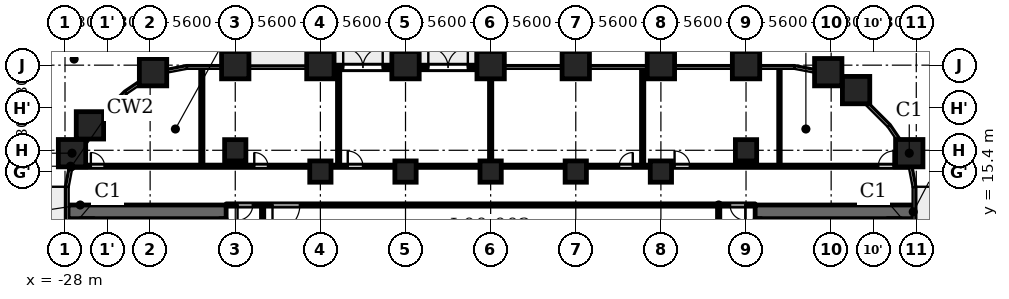
"""IFC4 building model, lengths in metres.
Left out: names, types, materials, properties, quantities, classifications, styles, units other than length and angle.
Written with IfcOpenShell. Run it as: python <this file> out.ifc"""

import sys

from ifc_helpers import new_model, si_unit, direction, frame, frame_2d, origin, origin_2d, place, context, subcontext, project, spatial, rectangle, extrude, element, fill, save


model = new_model("IFC4")
c1 = context("Model", 3, precision=1e-05, world=origin(), true_north=direction((0.0, 1.0)))
c2 = subcontext(c1, "Body", "Model", "MODEL_VIEW")
j1 = project(units=[si_unit("LENGTHUNIT", "METRE"), si_unit("PLANEANGLEUNIT", "RADIAN")], contexts=[c1])
p1 = place(None, origin())
s1 = spatial("IfcSite", under=j1, at=p1, CompositionType="ELEMENT")
p2 = place(p1, origin())
s2 = spatial("IfcBuilding", under=s1, at=p2, CompositionType="ELEMENT")
p3 = place(p2, origin())
s3 = spatial("IfcBuildingStorey", under=s2, at=p3, CompositionType="ELEMENT", Elevation=0.0)
for number, where, z_axis, x_axis in (
    (1, (27.538, 16.609, 0.0), (0.0, 0.0, 1.0), (1.0, 0.0, 0.0)),
    (2, (24.04, 20.76, 0.0), (0.0, 0.0, 1.0), (1.0, 0.0, 0.0)),
    (3, (22.209, 21.938, 0.0), (0.0, 0.0, 1.0), (1.0, 0.0, 0.0)),
    (4, (16.8, 22.4, 0.0), (0.0, 0.0, 1.0), (1.0, 0.0, 0.0)),
    (5, (11.2, 22.4, 0.0), (0.0, 0.0, 1.0), (1.0, 0.0, 0.0)),
    (6, (5.6, 22.4, 0.0), (0.0, 0.0, 1.0), (1.0, 0.0, 0.0)),
    (7, (0.0, 22.4, 0.0), (0.0, 0.0, 1.0), (1.0, 0.0, 0.0)),
    (8, (-5.6, 22.4, 0.0), (0.0, 0.0, 1.0), (1.0, 0.0, 0.0)),
    (9, (-11.2, 22.4, 0.0), (0.0, 0.0, 1.0), (1.0, 0.0, 0.0)),
    (10, (-16.8, 22.4, 0.0), (0.0, 0.0, 1.0), (1.0, 0.0, 0.0)),
    (11, (-22.209, 21.938, 0.0), (0.0, 0.0, 1.0), (1.0, 0.0, 0.0)),
    (12, (-26.36, 18.44, 0.0), (0.0, 0.0, 1.0), (1.0, 0.0, 0.0)),
    (13, (-27.538, 16.609, 0.0), (0.0, 0.0, 1.0), (1.0, 0.0, 0.0)),
):
    element("IfcColumn", number, at=place(p3, frame(where, z_axis=z_axis, x_axis=x_axis)), inside=s3, PredefinedType="COLUMN", context=c2, shape_type="SweptSolid", body=[
        extrude(rectangle(XDim=1.8, YDim=1.8, at=origin_2d()), origin(), (0.0, 0.0, 1.0), 6.5),
    ])
for number, where, z_axis, x_axis in (
    (14, (-16.8, 16.8, 0.0), (0.0, 0.0, 1.0), (1.0, 0.0, 0.0)),
    (15, (16.8, 16.8, 0.0), (0.0, 0.0, 1.0), (1.0, 0.0, 0.0)),
    (16, (-11.2, 15.4, 0.0), (0.0, 0.0, 1.0), (1.0, 0.0, 0.0)),
    (17, (-5.6, 15.4, 0.0), (0.0, 0.0, 1.0), (1.0, 0.0, 0.0)),
    (18, (0.0, 15.4, 0.0), (0.0, 0.0, 1.0), (1.0, 0.0, 0.0)),
    (19, (5.6, 15.4, 0.0), (0.0, 0.0, 1.0), (1.0, 0.0, 0.0)),
    (20, (11.2, 15.4, 0.0), (0.0, 0.0, 1.0), (1.0, 0.0, 0.0)),
):
    element("IfcColumn", number, at=place(p3, frame(where, z_axis=z_axis, x_axis=x_axis)), inside=s3, PredefinedType="COLUMN", context=c2, shape_type="SweptSolid", body=[
        extrude(rectangle(XDim=1.4, YDim=1.4, at=origin_2d()), origin(), (0.0, 0.0, 1.0), 6.5),
    ])
p4 = place(p3, frame((-4.7, 22.25, 0.0), z_axis=(0.0, 0.0, 1.0), x_axis=(1.0, 0.0, 0.0)))
e21 = element("IfcWall", 21, at=p4, inside=s3, PredefinedType="SOLIDWALL", context=c2, shape_type="SweptSolid", body=[
    extrude(rectangle(XDim=3.8, YDim=0.3, at=frame_2d((1.9, 0.0))), origin(), (0.0, 0.0, 1.0), 5.25),
])
p5 = place(p4, frame((0.6, 0.0, 0.0)))
e22 = element("IfcOpeningElement", 22, at=p5, cuts=e21, PredefinedType="OPENING", context=c2, shape_type="SweptSolid", body=[
    extrude(rectangle(XDim=2.6, YDim=2.4, at=frame_2d((1.3, 1.2))), frame((0.0, 0.16, 0.0), z_axis=(0.0, -1.0, 0.0), x_axis=(1.0, 0.0, 0.0)), (0.0, 0.0, 1.0), 0.32),
])
p6 = place(p3, frame((-10.3, 22.25, 0.0), z_axis=(0.0, 0.0, 1.0), x_axis=(1.0, 0.0, 0.0)))
e23 = element("IfcWall", 23, at=p6, inside=s3, PredefinedType="SOLIDWALL", context=c2, shape_type="SweptSolid", body=[
    extrude(rectangle(XDim=3.8, YDim=0.3, at=frame_2d((1.9, 0.0))), origin(), (0.0, 0.0, 1.0), 5.25),
])
p7 = place(p6, frame((0.6, 0.0, 0.0)))
e24 = element("IfcOpeningElement", 24, at=p7, cuts=e23, PredefinedType="OPENING", context=c2, shape_type="SweptSolid", body=[
    extrude(rectangle(XDim=2.6, YDim=2.4, at=frame_2d((1.3, 1.2))), frame((0.0, 0.16, 0.0), z_axis=(0.0, -1.0, 0.0), x_axis=(1.0, 0.0, 0.0)), (0.0, 0.0, 1.0), 0.32),
])
p8 = place(p3, frame((-17.4, 12.75, 0.0), z_axis=(0.0, 0.0, 1.0), x_axis=(-1.0, 0.0, 0.0)))
e25 = element("IfcWall", 25, at=p8, inside=s3, PredefinedType="SHEAR", context=c2, shape_type="SweptSolid", body=[
    extrude(rectangle(XDim=10.4, YDim=0.9, at=frame_2d((5.2, 0.0))), origin(), (0.0, 0.0, 1.0), 6.15),
])
p9 = place(p3, frame((-17.6, -12.3, 0.0), z_axis=(0.0, 0.0, 1.0), x_axis=(0.0, 1.0, 0.0)))
e26 = element("IfcWall", 26, at=p9, inside=s3, PredefinedType="SHEAR", context=c2, shape_type="SweptSolid", body=[
    extrude(rectangle(XDim=24.6, YDim=0.4, at=frame_2d((12.3, 0.0))), origin(), (0.0, 0.0, 1.0), 6.15),
])
p10 = place(p9, frame((6.0, 0.0, 0.0)))
e27 = element("IfcOpeningElement", 27, at=p10, cuts=e26, PredefinedType="OPENING", context=c2, shape_type="SweptSolid", body=[
    extrude(rectangle(XDim=1.1, YDim=2.1, at=frame_2d((0.55, 1.05))), frame((0.0, 0.21, 0.0), z_axis=(0.0, -1.0, 0.0), x_axis=(1.0, 0.0, 0.0)), (0.0, 0.0, 1.0), 0.42),
])
p11 = place(p9, frame((8.4, 0.0, 0.0)))
e28 = element("IfcOpeningElement", 28, at=p11, cuts=e26, PredefinedType="OPENING", context=c2, shape_type="SweptSolid", body=[
    extrude(rectangle(XDim=1.1, YDim=2.1, at=frame_2d((0.55, 1.05))), frame((0.0, 0.21, 0.0), z_axis=(0.0, -1.0, 0.0), x_axis=(1.0, 0.0, 0.0)), (0.0, 0.0, 1.0), 0.42),
])
p12 = place(p9, frame((10.8, 0.0, 0.0)))
e29 = element("IfcOpeningElement", 29, at=p12, cuts=e26, PredefinedType="OPENING", context=c2, shape_type="SweptSolid", body=[
    extrude(rectangle(XDim=1.1, YDim=2.1, at=frame_2d((0.55, 1.05))), frame((0.0, 0.21, 0.0), z_axis=(0.0, -1.0, 0.0), x_axis=(1.0, 0.0, 0.0)), (0.0, 0.0, 1.0), 0.42),
])
p13 = place(p9, frame((16.75, 0.0, 0.0)))
e30 = element("IfcOpeningElement", 30, at=p13, cuts=e26, PredefinedType="OPENING", context=c2, shape_type="SweptSolid", body=[
    extrude(rectangle(XDim=0.9, YDim=2.1, at=frame_2d((0.45, 1.05))), frame((0.0, 0.21, 0.0), z_axis=(0.0, -1.0, 0.0), x_axis=(1.0, 0.0, 0.0)), (0.0, 0.0, 1.0), 0.42),
])
p14 = place(p9, frame((22.8, 0.0, 0.0)))
e31 = element("IfcOpeningElement", 31, at=p14, cuts=e26, PredefinedType="OPENING", context=c2, shape_type="SweptSolid", body=[
    extrude(rectangle(XDim=1.1, YDim=2.1, at=frame_2d((0.55, 1.05))), frame((0.0, 0.21, 0.0), z_axis=(0.0, -1.0, 0.0), x_axis=(1.0, 0.0, 0.0)), (0.0, 0.0, 1.0), 0.42),
])
p15 = place(p9, frame((0.7, 0.0, 0.0)))
e32 = element("IfcOpeningElement", 32, at=p15, cuts=e26, PredefinedType="OPENING", context=c2, shape_type="SweptSolid", body=[
    extrude(rectangle(XDim=1.1, YDim=2.1, at=frame_2d((0.55, 1.05))), frame((0.0, 0.21, 0.0), z_axis=(0.0, -1.0, 0.0), x_axis=(1.0, 0.0, 0.0)), (0.0, 0.0, 1.0), 0.42),
])
p16 = place(p9, frame((12.775, 0.0, 0.0)))
e33 = element("IfcOpeningElement", 33, at=p16, cuts=e26, PredefinedType="OPENING", context=c2, shape_type="SweptSolid", body=[
    extrude(rectangle(XDim=1.8, YDim=2.1, at=frame_2d((0.9, 1.05))), frame((0.0, 0.21, 0.0), z_axis=(0.0, -1.0, 0.0), x_axis=(1.0, 0.0, 0.0)), (0.0, 0.0, 1.0), 0.42),
])
p17 = place(p3, frame((-26.55, -12.3, 0.0), z_axis=(0.0, 0.0, 1.0), x_axis=(0.0, 1.0, 0.0)))
e34 = element("IfcWall", 34, at=p17, inside=s3, PredefinedType="SHEAR", context=c2, shape_type="SweptSolid", body=[
    extrude(rectangle(XDim=24.6, YDim=0.9, at=frame_2d((12.3, 0.0))), origin(), (0.0, 0.0, 1.0), 6.15),
])
p18 = place(p3, frame((-23.55, 9.8, 0.0), z_axis=(0.0, 0.0, 1.0), x_axis=(0.0, 1.0, 0.0)))
e35 = element("IfcWall", 35, at=p18, inside=s3, PredefinedType="PARTITIONING", context=c2, shape_type="SweptSolid", body=[
    extrude(rectangle(XDim=2.5, YDim=0.2, at=frame_2d((1.25, 0.0))), origin(), (0.0, 0.0, 1.0), 6.15),
])
p19 = place(p18, frame((0.8, 0.0, 0.0)))
e36 = element("IfcOpeningElement", 36, at=p19, cuts=e35, PredefinedType="OPENING", context=c2, shape_type="SweptSolid", body=[
    extrude(rectangle(XDim=0.9, YDim=2.1, at=frame_2d((0.45, 1.05))), frame((0.0, 0.11, 0.0), z_axis=(0.0, -1.0, 0.0), x_axis=(1.0, 0.0, 0.0)), (0.0, 0.0, 1.0), 0.22),
])
p20 = place(p3, frame((17.4, 12.75, 0.0), z_axis=(0.0, 0.0, 1.0), x_axis=(1.0, 0.0, 0.0)))
e37 = element("IfcWall", 37, at=p20, inside=s3, PredefinedType="SHEAR", context=c2, shape_type="SweptSolid", body=[
    extrude(rectangle(XDim=10.4, YDim=0.9, at=frame_2d((5.2, 0.0))), origin(), (0.0, 0.0, 1.0), 6.15),
])
p21 = place(p3, frame((17.6, -12.3, 0.0), z_axis=(0.0, 0.0, 1.0), x_axis=(0.0, 1.0, 0.0)))
e38 = element("IfcWall", 38, at=p21, inside=s3, PredefinedType="SHEAR", context=c2, shape_type="SweptSolid", body=[
    extrude(rectangle(XDim=24.6, YDim=0.4, at=frame_2d((12.3, 0.0))), origin(), (0.0, 0.0, 1.0), 6.15),
])
p22 = place(p21, frame((6.0, 0.0, 0.0)))
e39 = element("IfcOpeningElement", 39, at=p22, cuts=e38, PredefinedType="OPENING", context=c2, shape_type="SweptSolid", body=[
    extrude(rectangle(XDim=1.1, YDim=2.1, at=frame_2d((0.55, 1.05))), frame((0.0, 0.21, 0.0), z_axis=(0.0, -1.0, 0.0), x_axis=(1.0, 0.0, 0.0)), (0.0, 0.0, 1.0), 0.42),
])
p23 = place(p21, frame((8.4, 0.0, 0.0)))
e40 = element("IfcOpeningElement", 40, at=p23, cuts=e38, PredefinedType="OPENING", context=c2, shape_type="SweptSolid", body=[
    extrude(rectangle(XDim=1.1, YDim=2.1, at=frame_2d((0.55, 1.05))), frame((0.0, 0.21, 0.0), z_axis=(0.0, -1.0, 0.0), x_axis=(1.0, 0.0, 0.0)), (0.0, 0.0, 1.0), 0.42),
])
p24 = place(p21, frame((10.8, 0.0, 0.0)))
e41 = element("IfcOpeningElement", 41, at=p24, cuts=e38, PredefinedType="OPENING", context=c2, shape_type="SweptSolid", body=[
    extrude(rectangle(XDim=1.1, YDim=2.1, at=frame_2d((0.55, 1.05))), frame((0.0, 0.21, 0.0), z_axis=(0.0, -1.0, 0.0), x_axis=(1.0, 0.0, 0.0)), (0.0, 0.0, 1.0), 0.42),
])
p25 = place(p21, frame((16.75, 0.0, 0.0)))
e42 = element("IfcOpeningElement", 42, at=p25, cuts=e38, PredefinedType="OPENING", context=c2, shape_type="SweptSolid", body=[
    extrude(rectangle(XDim=0.9, YDim=2.1, at=frame_2d((0.45, 1.05))), frame((0.0, 0.21, 0.0), z_axis=(0.0, -1.0, 0.0), x_axis=(1.0, 0.0, 0.0)), (0.0, 0.0, 1.0), 0.42),
])
p26 = place(p21, frame((22.8, 0.0, 0.0)))
e43 = element("IfcOpeningElement", 43, at=p26, cuts=e38, PredefinedType="OPENING", context=c2, shape_type="SweptSolid", body=[
    extrude(rectangle(XDim=1.1, YDim=2.1, at=frame_2d((0.55, 1.05))), frame((0.0, 0.21, 0.0), z_axis=(0.0, -1.0, 0.0), x_axis=(1.0, 0.0, 0.0)), (0.0, 0.0, 1.0), 0.42),
])
p27 = place(p21, frame((0.7, 0.0, 0.0)))
e44 = element("IfcOpeningElement", 44, at=p27, cuts=e38, PredefinedType="OPENING", context=c2, shape_type="SweptSolid", body=[
    extrude(rectangle(XDim=1.1, YDim=2.1, at=frame_2d((0.55, 1.05))), frame((0.0, 0.21, 0.0), z_axis=(0.0, -1.0, 0.0), x_axis=(1.0, 0.0, 0.0)), (0.0, 0.0, 1.0), 0.42),
])
p28 = place(p21, frame((12.775, 0.0, 0.0)))
e45 = element("IfcOpeningElement", 45, at=p28, cuts=e38, PredefinedType="OPENING", context=c2, shape_type="SweptSolid", body=[
    extrude(rectangle(XDim=1.8, YDim=2.1, at=frame_2d((0.9, 1.05))), frame((0.0, 0.21, 0.0), z_axis=(0.0, -1.0, 0.0), x_axis=(1.0, 0.0, 0.0)), (0.0, 0.0, 1.0), 0.42),
])
p29 = place(p3, frame((26.55, -12.3, 0.0), z_axis=(0.0, 0.0, 1.0), x_axis=(0.0, 1.0, 0.0)))
e46 = element("IfcWall", 46, at=p29, inside=s3, PredefinedType="SHEAR", context=c2, shape_type="SweptSolid", body=[
    extrude(rectangle(XDim=24.6, YDim=0.9, at=frame_2d((12.3, 0.0))), origin(), (0.0, 0.0, 1.0), 6.15),
])
p30 = place(p3, frame((23.55, 9.8, 0.0), z_axis=(0.0, 0.0, 1.0), x_axis=(0.0, 1.0, 0.0)))
e47 = element("IfcWall", 47, at=p30, inside=s3, PredefinedType="PARTITIONING", context=c2, shape_type="SweptSolid", body=[
    extrude(rectangle(XDim=2.5, YDim=0.2, at=frame_2d((1.25, 0.0))), origin(), (0.0, 0.0, 1.0), 6.15),
])
p31 = place(p30, frame((0.8, 0.0, 0.0)))
e48 = element("IfcOpeningElement", 48, at=p31, cuts=e47, PredefinedType="OPENING", context=c2, shape_type="SweptSolid", body=[
    extrude(rectangle(XDim=0.9, YDim=2.1, at=frame_2d((0.45, 1.05))), frame((0.0, 0.11, 0.0), z_axis=(0.0, -1.0, 0.0), x_axis=(1.0, 0.0, 0.0)), (0.0, 0.0, 1.0), 0.22),
])
p32 = place(p3, frame((-17.4, 13.2, 0.0), z_axis=(0.0, 0.0, 1.0), x_axis=(1.0, 0.0, 0.0)))
e49 = element("IfcWall", 49, at=p32, inside=s3, PredefinedType="PARTITIONING", context=c2, shape_type="SweptSolid", body=[
    extrude(rectangle(XDim=34.8, YDim=0.15, at=frame_2d((17.4, 0.0))), origin(), (0.0, 0.0, 1.0), 6.15),
])
p33 = place(p32, frame((3.05, 0.0, 0.0)))
e50 = element("IfcOpeningElement", 50, at=p33, cuts=e49, PredefinedType="OPENING", context=c2, shape_type="SweptSolid", body=[
    extrude(rectangle(XDim=1.8, YDim=2.1, at=frame_2d((0.9, 1.05))), frame((0.0, 0.085, 0.0), z_axis=(0.0, -1.0, 0.0), x_axis=(1.0, 0.0, 0.0)), (0.0, 0.0, 1.0), 0.17),
])
p34 = place(p32, frame((0.75, 0.0, 0.0)))
e51 = element("IfcOpeningElement", 51, at=p34, cuts=e49, PredefinedType="OPENING", context=c2, shape_type="SweptSolid", body=[
    extrude(rectangle(XDim=1.0, YDim=2.1, at=frame_2d((0.5, 1.05))), frame((0.0, 0.085, 0.0), z_axis=(0.0, -1.0, 0.0), x_axis=(1.0, 0.0, 0.0)), (0.0, 0.0, 1.0), 0.17),
])
p35 = place(p32, frame((33.15, 0.0, 0.0)))
e52 = element("IfcOpeningElement", 52, at=p35, cuts=e49, PredefinedType="OPENING", context=c2, shape_type="SweptSolid", body=[
    extrude(rectangle(XDim=1.0, YDim=2.1, at=frame_2d((0.5, 1.05))), frame((0.0, 0.085, 0.0), z_axis=(0.0, -1.0, 0.0), x_axis=(1.0, 0.0, 0.0)), (0.0, 0.0, 1.0), 0.17),
])
p36 = place(p3, frame((-27.64, 15.75, 0.0), z_axis=(0.0, 0.0, 1.0), x_axis=(1.0, 0.0, 0.0)))
e53 = element("IfcWall", 53, at=p36, inside=s3, PredefinedType="PARTITIONING", context=c2, shape_type="SweptSolid", body=[
    extrude(rectangle(XDim=55.28, YDim=0.15, at=frame_2d((27.64, 0.0))), origin(), (0.0, 0.0, 1.0), 6.15),
])
p37 = place(p36, frame((1.34, 0.0, 0.0)))
e54 = element("IfcOpeningElement", 54, at=p37, cuts=e53, PredefinedType="OPENING", context=c2, shape_type="SweptSolid", body=[
    extrude(rectangle(XDim=0.9, YDim=2.1, at=frame_2d((0.45, 1.05))), frame((0.0, 0.085, 0.0), z_axis=(0.0, -1.0, 0.0), x_axis=(1.0, 0.0, 0.0)), (0.0, 0.0, 1.0), 0.17),
])
p38 = place(p36, frame((12.09, 0.0, 0.0)))
e55 = element("IfcOpeningElement", 55, at=p38, cuts=e53, PredefinedType="OPENING", context=c2, shape_type="SweptSolid", body=[
    extrude(rectangle(XDim=0.9, YDim=2.1, at=frame_2d((0.45, 1.05))), frame((0.0, 0.085, 0.0), z_axis=(0.0, -1.0, 0.0), x_axis=(1.0, 0.0, 0.0)), (0.0, 0.0, 1.0), 0.17),
])
p39 = place(p36, frame((18.24, 0.0, 0.0)))
e56 = element("IfcOpeningElement", 56, at=p39, cuts=e53, PredefinedType="OPENING", context=c2, shape_type="SweptSolid", body=[
    extrude(rectangle(XDim=1.0, YDim=2.1, at=frame_2d((0.5, 1.05))), frame((0.0, 0.085, 0.0), z_axis=(0.0, -1.0, 0.0), x_axis=(1.0, 0.0, 0.0)), (0.0, 0.0, 1.0), 0.17),
])
p40 = place(p36, frame((36.09, 0.0, 0.0)))
e57 = element("IfcOpeningElement", 57, at=p40, cuts=e53, PredefinedType="OPENING", context=c2, shape_type="SweptSolid", body=[
    extrude(rectangle(XDim=0.9, YDim=2.1, at=frame_2d((0.45, 1.05))), frame((0.0, 0.085, 0.0), z_axis=(0.0, -1.0, 0.0), x_axis=(1.0, 0.0, 0.0)), (0.0, 0.0, 1.0), 0.17),
])
p41 = place(p36, frame((39.74, 0.0, 0.0)))
e58 = element("IfcOpeningElement", 58, at=p41, cuts=e53, PredefinedType="OPENING", context=c2, shape_type="SweptSolid", body=[
    extrude(rectangle(XDim=1.0, YDim=2.1, at=frame_2d((0.5, 1.05))), frame((0.0, 0.085, 0.0), z_axis=(0.0, -1.0, 0.0), x_axis=(1.0, 0.0, 0.0)), (0.0, 0.0, 1.0), 0.17),
])
p42 = place(p36, frame((53.141, 0.0, 0.0)))
e59 = element("IfcOpeningElement", 59, at=p42, cuts=e53, PredefinedType="OPENING", context=c2, shape_type="SweptSolid", body=[
    extrude(rectangle(XDim=1.0, YDim=2.1, at=frame_2d((0.5, 1.05))), frame((0.0, 0.085, 0.0), z_axis=(0.0, -1.0, 0.0), x_axis=(1.0, 0.0, 0.0)), (0.0, 0.0, 1.0), 0.17),
])
p43 = place(p3, frame((-19.0, 15.825, 0.0), z_axis=(0.0, 0.0, 1.0), x_axis=(0.0, 1.0, 0.0)))
e60 = element("IfcWall", 60, at=p43, inside=s3, PredefinedType="PARTITIONING", context=c2, shape_type="SweptSolid", body=[
    extrude(rectangle(XDim=6.393, YDim=0.15, at=frame_2d((3.197, 0.0))), origin(), (0.0, 0.0, 1.0), 6.15),
])
p44 = place(p3, frame((-15.0, 6.769, 0.0), z_axis=(0.0, 0.0, 1.0), x_axis=(0.0, 1.0, 0.0)))
e61 = element("IfcWall", 61, at=p44, inside=s3, PredefinedType="PARTITIONING", context=c2, shape_type="SweptSolid", body=[
    extrude(rectangle(XDim=6.356, YDim=0.15, at=frame_2d((3.178, 0.0))), origin(), (0.0, 0.0, 1.0), 6.15),
])
p45 = place(p3, frame((-10.0, 15.825, 0.0), z_axis=(0.0, 0.0, 1.0), x_axis=(0.0, 1.0, 0.0)))
e62 = element("IfcWall", 62, at=p45, inside=s3, PredefinedType="PARTITIONING", context=c2, shape_type="SweptSolid", body=[
    extrude(rectangle(XDim=6.255, YDim=0.15, at=frame_2d((3.127, 0.0))), origin(), (0.0, 0.0, 1.0), 6.15),
])
p46 = place(p3, frame((0.0, 15.825, 0.0), z_axis=(0.0, 0.0, 1.0), x_axis=(0.0, 1.0, 0.0)))
e63 = element("IfcWall", 63, at=p46, inside=s3, PredefinedType="PARTITIONING", context=c2, shape_type="SweptSolid", body=[
    extrude(rectangle(XDim=6.485, YDim=0.15, at=frame_2d((3.243, 0.0))), origin(), (0.0, 0.0, 1.0), 6.15),
])
p47 = place(p3, frame((10.0, 15.825, 0.0), z_axis=(0.0, 0.0, 1.0), x_axis=(0.0, 1.0, 0.0)))
e64 = element("IfcWall", 64, at=p47, inside=s3, PredefinedType="PARTITIONING", context=c2, shape_type="SweptSolid", body=[
    extrude(rectangle(XDim=6.393, YDim=0.15, at=frame_2d((3.197, 0.0))), origin(), (0.0, 0.0, 1.0), 6.15),
])
p48 = place(p3, frame((15.0, 6.769, 0.0), z_axis=(0.0, 0.0, 1.0), x_axis=(0.0, 1.0, 0.0)))
e65 = element("IfcWall", 65, at=p48, inside=s3, PredefinedType="PARTITIONING", context=c2, shape_type="SweptSolid", body=[
    extrude(rectangle(XDim=6.356, YDim=0.15, at=frame_2d((3.178, 0.0))), origin(), (0.0, 0.0, 1.0), 6.15),
])
p49 = place(p3, frame((19.0, 15.825, 0.0), z_axis=(0.0, 0.0, 1.0), x_axis=(0.0, 1.0, 0.0)))
e66 = element("IfcWall", 66, at=p49, inside=s3, PredefinedType="PARTITIONING", context=c2, shape_type="SweptSolid", body=[
    extrude(rectangle(XDim=6.393, YDim=0.1, at=frame_2d((3.197, 0.0))), origin(), (0.0, 0.0, 1.0), 6.15),
])
p50 = place(p5, origin())
e67 = element("IfcDoor", 67, at=p50, inside=s3, OperationType="SINGLE_SWING_LEFT", PredefinedType="DOOR", context=c2, shape_type="SweptSolid", body=[
    extrude(rectangle(XDim=2.6, YDim=2.4, at=frame_2d((1.3, 1.2))), frame((0.0, 0.025, 0.0), z_axis=(0.0, -1.0, 0.0), x_axis=(1.0, 0.0, 0.0)), (0.0, 0.0, 1.0), 0.05),
])
fill(e22, e67)
p51 = place(p7, origin())
e68 = element("IfcDoor", 68, at=p51, inside=s3, OperationType="SINGLE_SWING_LEFT", PredefinedType="DOOR", context=c2, shape_type="SweptSolid", body=[
    extrude(rectangle(XDim=2.6, YDim=2.4, at=frame_2d((1.3, 1.2))), frame((0.0, 0.025, 0.0), z_axis=(0.0, -1.0, 0.0), x_axis=(1.0, 0.0, 0.0)), (0.0, 0.0, 1.0), 0.05),
])
fill(e24, e68)
p52 = place(p33, origin())
e69 = element("IfcDoor", 69, at=p52, inside=s3, OperationType="SINGLE_SWING_LEFT", PredefinedType="DOOR", context=c2, shape_type="SweptSolid", body=[
    extrude(rectangle(XDim=1.8, YDim=2.1, at=frame_2d((0.9, 1.05))), frame((0.0, 0.025, 0.0), z_axis=(0.0, -1.0, 0.0), x_axis=(1.0, 0.0, 0.0)), (0.0, 0.0, 1.0), 0.05),
])
fill(e50, e69)
p53 = place(p34, origin())
e70 = element("IfcDoor", 70, at=p53, inside=s3, OperationType="SINGLE_SWING_LEFT", PredefinedType="DOOR", context=c2, shape_type="SweptSolid", body=[
    extrude(rectangle(XDim=1.0, YDim=2.1, at=frame_2d((0.5, 1.05))), frame((0.0, 0.025, 0.0), z_axis=(0.0, -1.0, 0.0), x_axis=(1.0, 0.0, 0.0)), (0.0, 0.0, 1.0), 0.05),
])
fill(e51, e70)
p54 = place(p35, origin())
e71 = element("IfcDoor", 71, at=p54, inside=s3, OperationType="SINGLE_SWING_RIGHT", PredefinedType="DOOR", context=c2, shape_type="SweptSolid", body=[
    extrude(rectangle(XDim=1.0, YDim=2.1, at=frame_2d((0.5, 1.05))), frame((0.0, 0.025, 0.0), z_axis=(0.0, -1.0, 0.0), x_axis=(1.0, 0.0, 0.0)), (0.0, 0.0, 1.0), 0.05),
])
fill(e52, e71)
p55 = place(p37, origin())
e72 = element("IfcDoor", 72, at=p55, inside=s3, OperationType="SINGLE_SWING_RIGHT", PredefinedType="DOOR", context=c2, shape_type="SweptSolid", body=[
    extrude(rectangle(XDim=0.9, YDim=2.1, at=frame_2d((0.45, 1.05))), frame((0.0, 0.025, 0.0), z_axis=(0.0, -1.0, 0.0), x_axis=(1.0, 0.0, 0.0)), (0.0, 0.0, 1.0), 0.05),
])
fill(e54, e72)
p56 = place(p38, origin())
e73 = element("IfcDoor", 73, at=p56, inside=s3, OperationType="SINGLE_SWING_RIGHT", PredefinedType="DOOR", context=c2, shape_type="SweptSolid", body=[
    extrude(rectangle(XDim=0.9, YDim=2.1, at=frame_2d((0.45, 1.05))), frame((0.0, 0.025, 0.0), z_axis=(0.0, -1.0, 0.0), x_axis=(1.0, 0.0, 0.0)), (0.0, 0.0, 1.0), 0.05),
])
fill(e55, e73)
p57 = place(p39, origin())
e74 = element("IfcDoor", 74, at=p57, inside=s3, OperationType="SINGLE_SWING_RIGHT", PredefinedType="DOOR", context=c2, shape_type="SweptSolid", body=[
    extrude(rectangle(XDim=1.0, YDim=2.1, at=frame_2d((0.5, 1.05))), frame((0.0, 0.025, 0.0), z_axis=(0.0, -1.0, 0.0), x_axis=(1.0, 0.0, 0.0)), (0.0, 0.0, 1.0), 0.05),
])
fill(e56, e74)
p58 = place(p40, origin())
e75 = element("IfcDoor", 75, at=p58, inside=s3, OperationType="SINGLE_SWING_LEFT", PredefinedType="DOOR", context=c2, shape_type="SweptSolid", body=[
    extrude(rectangle(XDim=0.9, YDim=2.1, at=frame_2d((0.45, 1.05))), frame((0.0, 0.025, 0.0), z_axis=(0.0, -1.0, 0.0), x_axis=(1.0, 0.0, 0.0)), (0.0, 0.0, 1.0), 0.05),
])
fill(e57, e75)
p59 = place(p41, origin())
e76 = element("IfcDoor", 76, at=p59, inside=s3, OperationType="SINGLE_SWING_RIGHT", PredefinedType="DOOR", context=c2, shape_type="SweptSolid", body=[
    extrude(rectangle(XDim=1.0, YDim=2.1, at=frame_2d((0.5, 1.05))), frame((0.0, 0.025, 0.0), z_axis=(0.0, -1.0, 0.0), x_axis=(1.0, 0.0, 0.0)), (0.0, 0.0, 1.0), 0.05),
])
fill(e58, e76)
p60 = place(p42, origin())
e77 = element("IfcDoor", 77, at=p60, inside=s3, OperationType="SINGLE_SWING_LEFT", PredefinedType="DOOR", context=c2, shape_type="SweptSolid", body=[
    extrude(rectangle(XDim=1.0, YDim=2.1, at=frame_2d((0.5, 1.05))), frame((0.0, 0.025, 0.0), z_axis=(0.0, -1.0, 0.0), x_axis=(1.0, 0.0, 0.0)), (0.0, 0.0, 1.0), 0.05),
])
fill(e59, e77)
save(model, sys.argv[1])
